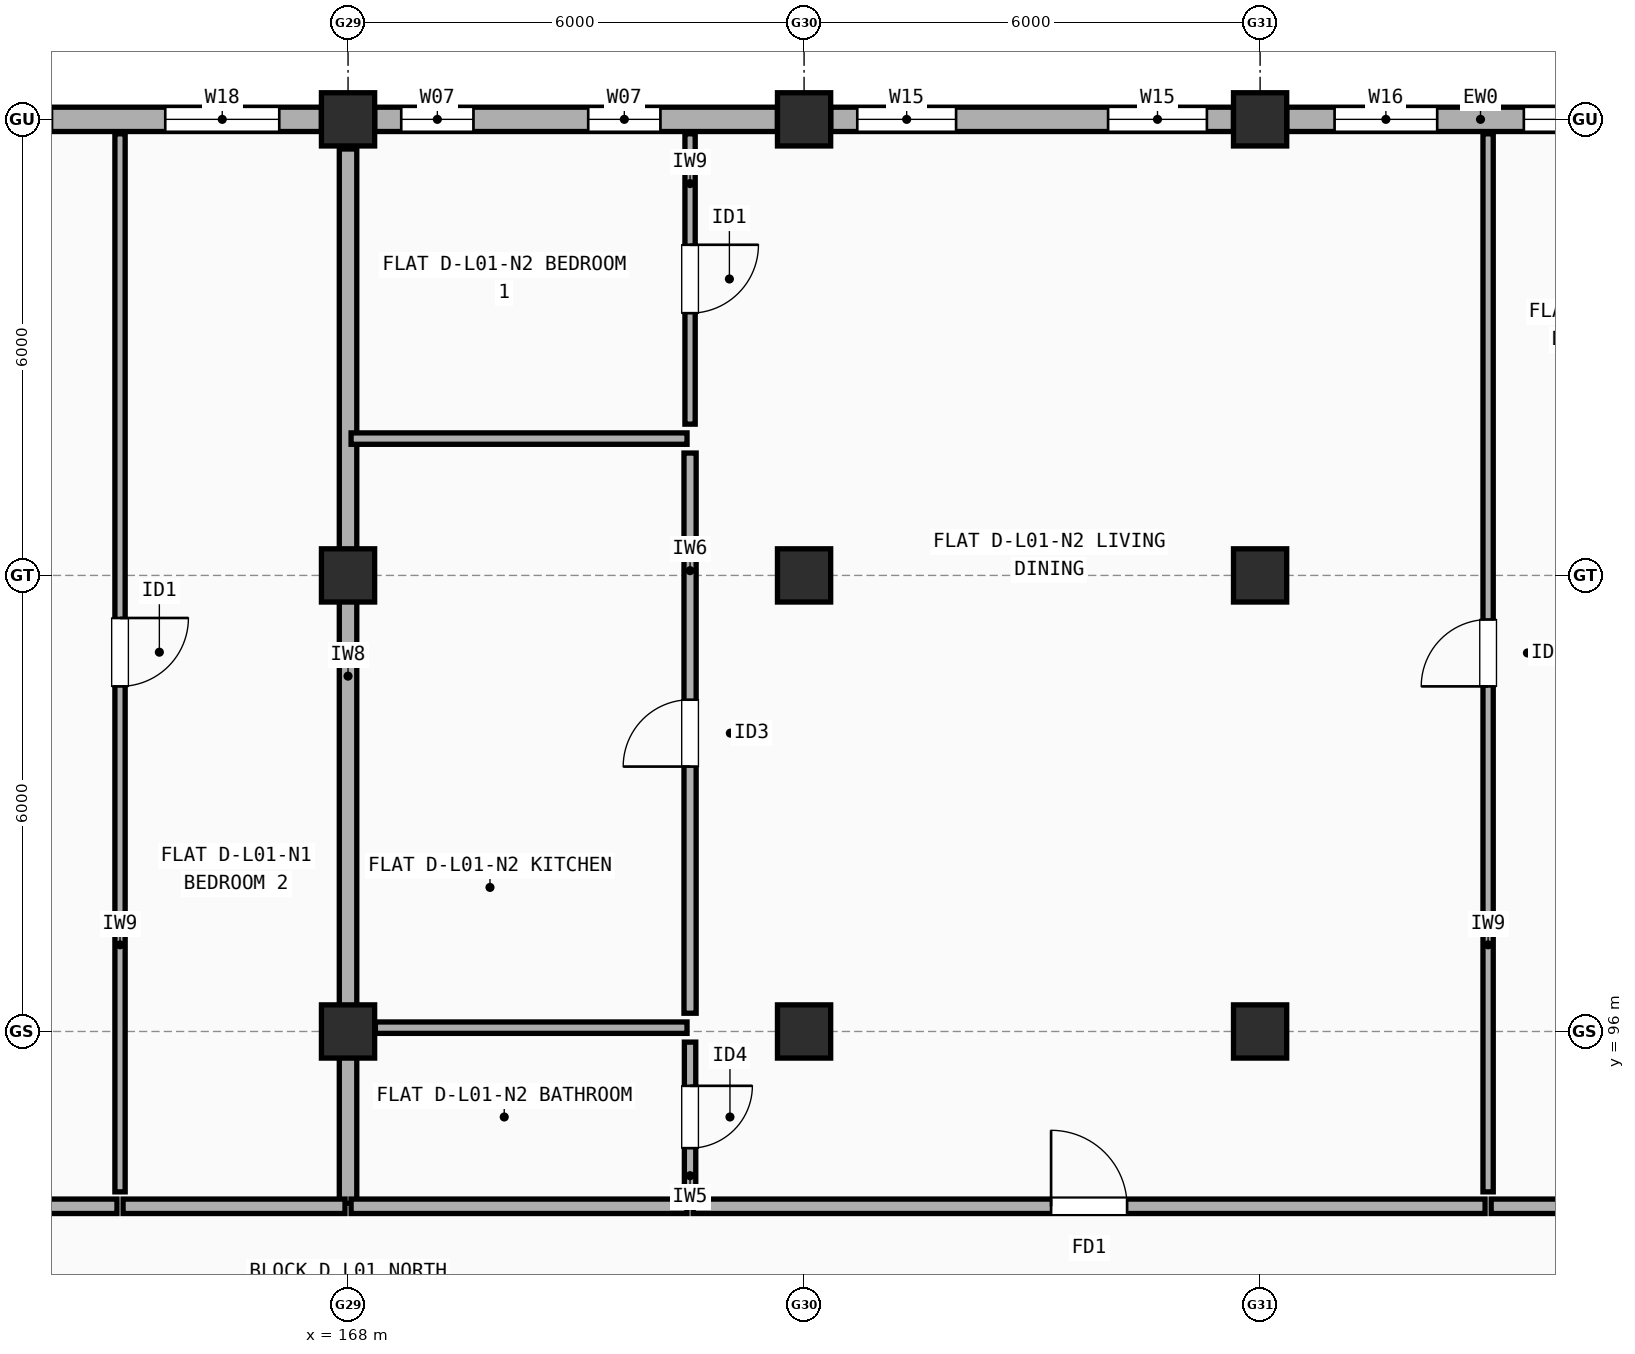
"""IFC4 building model, lengths in metres.
Left out: names, types, materials, properties, quantities, classifications, styles, units other than length and angle.
Written with IfcOpenShell. Run it as: python <this file> out.ifc"""

import sys

from ifc_helpers import new_model, si_unit, direction, frame, frame_2d, origin, origin_2d, place, context, subcontext, project, spatial, rectangle, extrude, element, fill, save


model = new_model("IFC4")
c1 = context("Model", 3, precision=1e-05, world=origin(), true_north=direction((0.0, 1.0)))
c2 = subcontext(c1, "Body", "Model", "MODEL_VIEW")
j1 = project(units=[si_unit("LENGTHUNIT", "METRE"), si_unit("PLANEANGLEUNIT", "RADIAN")], contexts=[c1])
p1 = place(None, origin())
s1 = spatial("IfcSite", under=j1, at=p1, CompositionType="ELEMENT")
p2 = place(p1, origin())
s2 = spatial("IfcBuilding", under=s1, at=p2, CompositionType="ELEMENT")
p3 = place(p2, frame((0.0, 0.0, 4.5)))
s3 = spatial("IfcBuildingStorey", under=s2, at=p3, CompositionType="ELEMENT", Elevation=4.5)
for number, where, z_axis, x_axis in (
    (1, (168.0, 96.0, 0.0), (0.0, 0.0, 1.0), (1.0, 0.0, 0.0)),
    (2, (168.0, 102.0, 0.0), (0.0, 0.0, 1.0), (1.0, 0.0, 0.0)),
    (3, (168.0, 108.0, 0.0), (0.0, 0.0, 1.0), (1.0, 0.0, 0.0)),
    (4, (174.0, 96.0, 0.0), (0.0, 0.0, 1.0), (1.0, 0.0, 0.0)),
    (5, (174.0, 102.0, 0.0), (0.0, 0.0, 1.0), (1.0, 0.0, 0.0)),
    (6, (174.0, 108.0, 0.0), (0.0, 0.0, 1.0), (1.0, 0.0, 0.0)),
    (7, (180.0, 96.0, 0.0), (0.0, 0.0, 1.0), (1.0, 0.0, 0.0)),
    (8, (180.0, 102.0, 0.0), (0.0, 0.0, 1.0), (1.0, 0.0, 0.0)),
    (9, (180.0, 108.0, 0.0), (0.0, 0.0, 1.0), (1.0, 0.0, 0.0)),
):
    element("IfcColumn", number, at=place(p3, frame(where, z_axis=z_axis, x_axis=x_axis)), inside=s3, PredefinedType="COLUMN", context=c2, shape_type="SweptSolid", body=[
        extrude(rectangle(XDim=0.7, YDim=0.7, at=origin_2d()), origin(), (0.0, 0.0, 1.0), 2.945),
    ])
p4 = place(p3, frame((185.7, 108.0, 0.0), z_axis=(0.0, 0.0, 1.0), x_axis=(-1.0, 0.0, 0.0)))
e10 = element("IfcWall", 10, at=p4, inside=s3, PredefinedType="STANDARD", context=c2, shape_type="SweptSolid", body=[
    extrude(rectangle(XDim=5.35, YDim=0.32, at=frame_2d((2.675, 0.0))), origin(), (0.0, 0.0, 1.0), 2.608),
])
p5 = place(p4, frame((0.43, 0.0, 0.9)))
e11 = element("IfcOpeningElement", 11, at=p5, cuts=e10, PredefinedType="OPENING", context=c2, shape_type="SweptSolid", body=[
    extrude(rectangle(XDim=1.8, YDim=1.45, at=frame_2d((0.9, 0.725))), frame((0.0, 0.17, 0.0), z_axis=(0.0, -1.0, 0.0), x_axis=(1.0, 0.0, 0.0)), (0.0, 0.0, 1.0), 0.34),
])
p6 = place(p4, frame((3.37, 0.0, 0.9)))
e12 = element("IfcOpeningElement", 12, at=p6, cuts=e10, PredefinedType="OPENING", context=c2, shape_type="SweptSolid", body=[
    extrude(rectangle(XDim=1.35, YDim=1.5, at=frame_2d((0.675, 0.75))), frame((0.0, 0.17, 0.0), z_axis=(0.0, -1.0, 0.0), x_axis=(1.0, 0.0, 0.0)), (0.0, 0.0, 1.0), 0.34),
])
p7 = place(p3, frame((179.65, 108.0, 0.0), z_axis=(0.0, 0.0, 1.0), x_axis=(-1.0, 0.0, 0.0)))
e13 = element("IfcWall", 13, at=p7, inside=s3, PredefinedType="STANDARD", context=c2, shape_type="SweptSolid", body=[
    extrude(rectangle(XDim=5.3, YDim=0.32, at=frame_2d((2.65, 0.0))), origin(), (0.0, 0.0, 1.0), 2.638),
])
p8 = place(p7, frame((0.35, 0.0, 0.9)))
e14 = element("IfcOpeningElement", 14, at=p8, cuts=e13, PredefinedType="OPENING", context=c2, shape_type="SweptSolid", body=[
    extrude(rectangle(XDim=1.3, YDim=1.45, at=frame_2d((0.65, 0.725))), frame((0.0, 0.17, 0.0), z_axis=(0.0, -1.0, 0.0), x_axis=(1.0, 0.0, 0.0)), (0.0, 0.0, 1.0), 0.34),
])
p9 = place(p7, frame((3.65, 0.0, 0.9)))
e15 = element("IfcOpeningElement", 15, at=p9, cuts=e13, PredefinedType="OPENING", context=c2, shape_type="SweptSolid", body=[
    extrude(rectangle(XDim=1.3, YDim=1.45, at=frame_2d((0.65, 0.725))), frame((0.0, 0.17, 0.0), z_axis=(0.0, -1.0, 0.0), x_axis=(1.0, 0.0, 0.0)), (0.0, 0.0, 1.0), 0.34),
])
p10 = place(p3, frame((173.65, 108.0, 0.0), z_axis=(0.0, 0.0, 1.0), x_axis=(-1.0, 0.0, 0.0)))
e16 = element("IfcWall", 16, at=p10, inside=s3, PredefinedType="STANDARD", context=c2, shape_type="SweptSolid", body=[
    extrude(rectangle(XDim=5.3, YDim=0.32, at=frame_2d((2.65, 0.0))), origin(), (0.0, 0.0, 1.0), 2.458),
])
p11 = place(p10, frame((1.54, 0.0, 0.9)))
e17 = element("IfcOpeningElement", 17, at=p11, cuts=e16, PredefinedType="OPENING", context=c2, shape_type="SweptSolid", body=[
    extrude(rectangle(XDim=0.95, YDim=1.35, at=frame_2d((0.475, 0.675))), frame((0.0, 0.17, 0.0), z_axis=(0.0, -1.0, 0.0), x_axis=(1.0, 0.0, 0.0)), (0.0, 0.0, 1.0), 0.34),
])
p12 = place(p10, frame((4.0, 0.0, 0.9)))
e18 = element("IfcOpeningElement", 18, at=p12, cuts=e16, PredefinedType="OPENING", context=c2, shape_type="SweptSolid", body=[
    extrude(rectangle(XDim=0.95, YDim=1.35, at=frame_2d((0.475, 0.675))), frame((0.0, 0.17, 0.0), z_axis=(0.0, -1.0, 0.0), x_axis=(1.0, 0.0, 0.0)), (0.0, 0.0, 1.0), 0.34),
])
p13 = place(p3, frame((167.65, 108.0, 0.0), z_axis=(0.0, 0.0, 1.0), x_axis=(-1.0, 0.0, 0.0)))
e19 = element("IfcWall", 19, at=p13, inside=s3, PredefinedType="STANDARD", context=c2, shape_type="SweptSolid", body=[
    extrude(rectangle(XDim=5.3, YDim=0.32, at=frame_2d((2.65, 0.0))), origin(), (0.0, 0.0, 1.0), 2.508),
])
p14 = place(p13, frame((0.555, 0.0, 0.9)))
e20 = element("IfcOpeningElement", 20, at=p14, cuts=e19, PredefinedType="OPENING", context=c2, shape_type="SweptSolid", body=[
    extrude(rectangle(XDim=1.5, YDim=1.4, at=frame_2d((0.75, 0.7))), frame((0.0, 0.17, 0.0), z_axis=(0.0, -1.0, 0.0), x_axis=(1.0, 0.0, 0.0)), (0.0, 0.0, 1.0), 0.34),
])
p15 = place(p13, frame((3.545, 0.0, 0.9)))
e21 = element("IfcOpeningElement", 21, at=p15, cuts=e19, PredefinedType="OPENING", context=c2, shape_type="SweptSolid", body=[
    extrude(rectangle(XDim=0.9, YDim=1.4, at=frame_2d((0.45, 0.7))), frame((0.0, 0.17, 0.0), z_axis=(0.0, -1.0, 0.0), x_axis=(1.0, 0.0, 0.0)), (0.0, 0.0, 1.0), 0.34),
])
p16 = place(p3, frame((168.0, 93.74, 0.0), z_axis=(0.0, 0.0, 1.0), x_axis=(0.0, 1.0, 0.0)))
e22 = element("IfcWall", 22, at=p16, inside=s3, PredefinedType="SOLIDWALL", context=c2, shape_type="SweptSolid", body=[
    extrude(rectangle(XDim=13.87, YDim=0.23, at=frame_2d((6.935, 0.0))), origin(), (0.0, 0.0, 1.0), 2.945),
])
p17 = place(p3, frame((154.54, 93.7, 0.0), z_axis=(0.0, 0.0, 1.0), x_axis=(1.0, 0.0, 0.0)))
e23 = element("IfcWall", 23, at=p17, inside=s3, PredefinedType="SOLIDWALL", context=c2, shape_type="SweptSolid", body=[
    extrude(rectangle(XDim=10.42, YDim=0.19, at=frame_2d((5.21, 0.0))), origin(), (0.0, 0.0, 1.0), 2.945),
])
p18 = place(p17, frame((4.72, 0.0, 0.0)))
e24 = element("IfcOpeningElement", 24, at=p18, cuts=e23, PredefinedType="OPENING", context=c2, shape_type="SweptSolid", body=[
    extrude(rectangle(XDim=0.98, YDim=2.15, at=frame_2d((0.49, 1.075))), frame((0.0, 0.105, 0.0), z_axis=(0.0, -1.0, 0.0), x_axis=(1.0, 0.0, 0.0)), (0.0, 0.0, 1.0), 0.21),
])
p19 = place(p3, frame((165.04, 93.7, 0.0), z_axis=(0.0, 0.0, 1.0), x_axis=(1.0, 0.0, 0.0)))
e25 = element("IfcWall", 25, at=p19, inside=s3, PredefinedType="SOLIDWALL", context=c2, shape_type="SweptSolid", body=[
    extrude(rectangle(XDim=2.92, YDim=0.19, at=frame_2d((1.46, 0.0))), origin(), (0.0, 0.0, 1.0), 2.945),
])
p20 = place(p3, frame((165.0, 93.89, 0.0), z_axis=(0.0, 0.0, 1.0), x_axis=(0.0, 1.0, 0.0)))
e26 = element("IfcWall", 26, at=p20, inside=s3, PredefinedType="PARTITIONING", context=c2, shape_type="SweptSolid", body=[
    extrude(rectangle(XDim=13.92, YDim=0.135, at=frame_2d((6.96, 0.0))), origin(), (0.0, 0.0, 1.0), 2.458),
])
p21 = place(p20, frame((6.65, 0.0, 0.0)))
e27 = element("IfcOpeningElement", 27, at=p21, cuts=e26, PredefinedType="OPENING", context=c2, shape_type="SweptSolid", body=[
    extrude(rectangle(XDim=0.9, YDim=2.1, at=frame_2d((0.45, 1.05))), frame((0.0, 0.077, 0.0), z_axis=(0.0, -1.0, 0.0), x_axis=(1.0, 0.0, 0.0)), (0.0, 0.0, 1.0), 0.155),
])
p22 = place(p3, frame((168.04, 93.7, 0.0), z_axis=(0.0, 0.0, 1.0), x_axis=(1.0, 0.0, 0.0)))
e28 = element("IfcWall", 28, at=p22, inside=s3, PredefinedType="SOLIDWALL", context=c2, shape_type="SweptSolid", body=[
    extrude(rectangle(XDim=4.42, YDim=0.19, at=frame_2d((2.21, 0.0))), origin(), (0.0, 0.0, 1.0), 2.945),
])
p23 = place(p3, frame((172.54, 93.7, 0.0), z_axis=(0.0, 0.0, 1.0), x_axis=(1.0, 0.0, 0.0)))
e29 = element("IfcWall", 29, at=p23, inside=s3, PredefinedType="SOLIDWALL", context=c2, shape_type="SweptSolid", body=[
    extrude(rectangle(XDim=10.42, YDim=0.19, at=frame_2d((5.21, 0.0))), origin(), (0.0, 0.0, 1.0), 2.945),
])
p24 = place(p23, frame((4.71, 0.0, 0.0)))
e30 = element("IfcOpeningElement", 30, at=p24, cuts=e29, PredefinedType="OPENING", context=c2, shape_type="SweptSolid", body=[
    extrude(rectangle(XDim=1.0, YDim=2.15, at=frame_2d((0.5, 1.075))), frame((0.0, 0.105, 0.0), z_axis=(0.0, -1.0, 0.0), x_axis=(1.0, 0.0, 0.0)), (0.0, 0.0, 1.0), 0.21),
])
p25 = place(p3, frame((172.5, 103.99, 0.0), z_axis=(0.0, 0.0, 1.0), x_axis=(0.0, 1.0, 0.0)))
e31 = element("IfcWall", 31, at=p25, inside=s3, PredefinedType="PARTITIONING", context=c2, shape_type="SweptSolid", body=[
    extrude(rectangle(XDim=3.82, YDim=0.135, at=frame_2d((1.91, 0.0))), origin(), (0.0, 0.0, 1.0), 2.945),
])
p26 = place(p25, frame((1.46, 0.0, 0.0)))
e32 = element("IfcOpeningElement", 32, at=p26, cuts=e31, PredefinedType="OPENING", context=c2, shape_type="SweptSolid", body=[
    extrude(rectangle(XDim=0.9, YDim=2.1, at=frame_2d((0.45, 1.05))), frame((0.0, 0.077, 0.0), z_axis=(0.0, -1.0, 0.0), x_axis=(1.0, 0.0, 0.0)), (0.0, 0.0, 1.0), 0.155),
])
p27 = place(p3, frame((172.5, 96.24, 0.0), z_axis=(0.0, 0.0, 1.0), x_axis=(0.0, 1.0, 0.0)))
e33 = element("IfcWall", 33, at=p27, inside=s3, PredefinedType="PLUMBINGWALL", context=c2, shape_type="SweptSolid", body=[
    extrude(rectangle(XDim=7.37, YDim=0.16, at=frame_2d((3.685, 0.0))), origin(), (0.0, 0.0, 1.0), 2.638),
])
p28 = place(p27, frame((3.245, 0.0, 0.0)))
e34 = element("IfcOpeningElement", 34, at=p28, cuts=e33, PredefinedType="OPENING", context=c2, shape_type="SweptSolid", body=[
    extrude(rectangle(XDim=0.88, YDim=2.1, at=frame_2d((0.44, 1.05))), frame((0.0, 0.09, 0.0), z_axis=(0.0, -1.0, 0.0), x_axis=(1.0, 0.0, 0.0)), (0.0, 0.0, 1.0), 0.18),
])
p29 = place(p3, frame((172.5, 93.89, 0.0), z_axis=(0.0, 0.0, 1.0), x_axis=(0.0, 1.0, 0.0)))
e35 = element("IfcWall", 35, at=p29, inside=s3, PredefinedType="PARTITIONING", context=c2, shape_type="SweptSolid", body=[
    extrude(rectangle(XDim=1.97, YDim=0.15, at=frame_2d((0.985, 0.0))), origin(), (0.0, 0.0, 1.0), 2.945),
])
p30 = place(p29, frame((0.575, 0.0, 0.0)))
e36 = element("IfcOpeningElement", 36, at=p30, cuts=e35, PredefinedType="OPENING", context=c2, shape_type="SweptSolid", body=[
    extrude(rectangle(XDim=0.82, YDim=2.08, at=frame_2d((0.41, 1.04))), frame((0.0, 0.085, 0.0), z_axis=(0.0, -1.0, 0.0), x_axis=(1.0, 0.0, 0.0)), (0.0, 0.0, 1.0), 0.17),
])
p31 = place(p3, frame((168.04, 103.8, 0.0), z_axis=(0.0, 0.0, 1.0), x_axis=(1.0, 0.0, 0.0)))
e37 = element("IfcWall", 37, at=p31, inside=s3, PredefinedType="PARTITIONING", context=c2, shape_type="SweptSolid", body=[
    extrude(rectangle(XDim=4.42, YDim=0.15, at=frame_2d((2.21, 0.0))), origin(), (0.0, 0.0, 1.0), 2.945),
])
p32 = place(p3, frame((168.36, 96.05, 0.0), z_axis=(0.0, 0.0, 1.0), x_axis=(1.0, 0.0, 0.0)))
e38 = element("IfcWall", 38, at=p32, inside=s3, PredefinedType="PARTITIONING", context=c2, shape_type="SweptSolid", body=[
    extrude(rectangle(XDim=4.1, YDim=0.15, at=frame_2d((2.05, 0.0))), origin(), (0.0, 0.0, 1.0), 2.608),
])
p33 = place(p3, frame((183.04, 93.7, 0.0), z_axis=(0.0, 0.0, 1.0), x_axis=(1.0, 0.0, 0.0)))
e39 = element("IfcWall", 39, at=p33, inside=s3, PredefinedType="SOLIDWALL", context=c2, shape_type="SweptSolid", body=[
    extrude(rectangle(XDim=2.92, YDim=0.19, at=frame_2d((1.46, 0.0))), origin(), (0.0, 0.0, 1.0), 2.945),
])
p34 = place(p3, frame((183.0, 93.89, 0.0), z_axis=(0.0, 0.0, 1.0), x_axis=(0.0, 1.0, 0.0)))
e40 = element("IfcWall", 40, at=p34, inside=s3, PredefinedType="PARTITIONING", context=c2, shape_type="SweptSolid", body=[
    extrude(rectangle(XDim=13.92, YDim=0.135, at=frame_2d((6.96, 0.0))), origin(), (0.0, 0.0, 1.0), 2.548),
])
p35 = place(p34, frame((6.65, 0.0, 0.0)))
e41 = element("IfcOpeningElement", 41, at=p35, cuts=e40, PredefinedType="OPENING", context=c2, shape_type="SweptSolid", body=[
    extrude(rectangle(XDim=0.88, YDim=2.1, at=frame_2d((0.44, 1.05))), frame((0.0, 0.077, 0.0), z_axis=(0.0, -1.0, 0.0), x_axis=(1.0, 0.0, 0.0)), (0.0, 0.0, 1.0), 0.155),
])
p36 = place(p5, origin())
e42 = element("IfcWindow", 42, at=p36, inside=s3, PartitioningType="SINGLE_PANEL", PredefinedType="WINDOW", context=c2, shape_type="SweptSolid", body=[
    extrude(rectangle(XDim=1.8, YDim=1.45, at=frame_2d((0.9, 0.725))), frame((0.0, 0.03, 0.0), z_axis=(0.0, -1.0, 0.0), x_axis=(1.0, 0.0, 0.0)), (0.0, 0.0, 1.0), 0.06),
])
fill(e11, e42)
p37 = place(p6, origin())
e43 = element("IfcWindow", 43, at=p37, inside=s3, PartitioningType="SINGLE_PANEL", PredefinedType="WINDOW", context=c2, shape_type="SweptSolid", body=[
    extrude(rectangle(XDim=1.35, YDim=1.5, at=frame_2d((0.675, 0.75))), frame((0.0, 0.03, 0.0), z_axis=(0.0, -1.0, 0.0), x_axis=(1.0, 0.0, 0.0)), (0.0, 0.0, 1.0), 0.06),
])
fill(e12, e43)
p38 = place(p8, origin())
e44 = element("IfcWindow", 44, at=p38, inside=s3, PartitioningType="SINGLE_PANEL", PredefinedType="WINDOW", context=c2, shape_type="SweptSolid", body=[
    extrude(rectangle(XDim=1.3, YDim=1.45, at=frame_2d((0.65, 0.725))), frame((0.0, 0.03, 0.0), z_axis=(0.0, -1.0, 0.0), x_axis=(1.0, 0.0, 0.0)), (0.0, 0.0, 1.0), 0.06),
])
fill(e14, e44)
p39 = place(p9, origin())
e45 = element("IfcWindow", 45, at=p39, inside=s3, PartitioningType="SINGLE_PANEL", PredefinedType="WINDOW", context=c2, shape_type="SweptSolid", body=[
    extrude(rectangle(XDim=1.3, YDim=1.45, at=frame_2d((0.65, 0.725))), frame((0.0, 0.03, 0.0), z_axis=(0.0, -1.0, 0.0), x_axis=(1.0, 0.0, 0.0)), (0.0, 0.0, 1.0), 0.06),
])
fill(e15, e45)
p40 = place(p11, origin())
e46 = element("IfcWindow", 46, at=p40, inside=s3, PartitioningType="SINGLE_PANEL", PredefinedType="WINDOW", context=c2, shape_type="SweptSolid", body=[
    extrude(rectangle(XDim=0.95, YDim=1.35, at=frame_2d((0.475, 0.675))), frame((0.0, 0.03, 0.0), z_axis=(0.0, -1.0, 0.0), x_axis=(1.0, 0.0, 0.0)), (0.0, 0.0, 1.0), 0.06),
])
fill(e17, e46)
p41 = place(p12, origin())
e47 = element("IfcWindow", 47, at=p41, inside=s3, PartitioningType="SINGLE_PANEL", PredefinedType="WINDOW", context=c2, shape_type="SweptSolid", body=[
    extrude(rectangle(XDim=0.95, YDim=1.35, at=frame_2d((0.475, 0.675))), frame((0.0, 0.03, 0.0), z_axis=(0.0, -1.0, 0.0), x_axis=(1.0, 0.0, 0.0)), (0.0, 0.0, 1.0), 0.06),
])
fill(e18, e47)
p42 = place(p14, origin())
e48 = element("IfcWindow", 48, at=p42, inside=s3, PartitioningType="SINGLE_PANEL", PredefinedType="WINDOW", context=c2, shape_type="SweptSolid", body=[
    extrude(rectangle(XDim=1.5, YDim=1.4, at=frame_2d((0.75, 0.7))), frame((0.0, 0.03, 0.0), z_axis=(0.0, -1.0, 0.0), x_axis=(1.0, 0.0, 0.0)), (0.0, 0.0, 1.0), 0.06),
])
fill(e20, e48)
p43 = place(p21, origin())
e49 = element("IfcDoor", 49, at=p43, inside=s3, OperationType="SINGLE_SWING_RIGHT", PredefinedType="DOOR", context=c2, shape_type="SweptSolid", body=[
    extrude(rectangle(XDim=0.9, YDim=2.1, at=frame_2d((0.45, 1.05))), frame((0.0, 0.025, 0.0), z_axis=(0.0, -1.0, 0.0), x_axis=(1.0, 0.0, 0.0)), (0.0, 0.0, 1.0), 0.05),
])
fill(e27, e49)
p44 = place(p24, origin())
e50 = element("IfcDoor", 50, at=p44, inside=s3, OperationType="SINGLE_SWING_LEFT", PredefinedType="DOOR", context=c2, shape_type="SweptSolid", body=[
    extrude(rectangle(XDim=1.0, YDim=2.15, at=frame_2d((0.5, 1.075))), frame((0.0, 0.025, 0.0), z_axis=(0.0, -1.0, 0.0), x_axis=(1.0, 0.0, 0.0)), (0.0, 0.0, 1.0), 0.05),
])
fill(e30, e50)
p45 = place(p26, origin())
e51 = element("IfcDoor", 51, at=p45, inside=s3, OperationType="SINGLE_SWING_RIGHT", PredefinedType="DOOR", context=c2, shape_type="SweptSolid", body=[
    extrude(rectangle(XDim=0.9, YDim=2.1, at=frame_2d((0.45, 1.05))), frame((0.0, 0.025, 0.0), z_axis=(0.0, -1.0, 0.0), x_axis=(1.0, 0.0, 0.0)), (0.0, 0.0, 1.0), 0.05),
])
fill(e32, e51)
p46 = place(p28, origin())
e52 = element("IfcDoor", 52, at=p46, inside=s3, OperationType="SINGLE_SWING_LEFT", PredefinedType="DOOR", context=c2, shape_type="SweptSolid", body=[
    extrude(rectangle(XDim=0.88, YDim=2.1, at=frame_2d((0.44, 1.05))), frame((0.0, 0.025, 0.0), z_axis=(0.0, -1.0, 0.0), x_axis=(1.0, 0.0, 0.0)), (0.0, 0.0, 1.0), 0.05),
])
fill(e34, e52)
p47 = place(p30, origin())
e53 = element("IfcDoor", 53, at=p47, inside=s3, OperationType="SINGLE_SWING_RIGHT", PredefinedType="DOOR", context=c2, shape_type="SweptSolid", body=[
    extrude(rectangle(XDim=0.82, YDim=2.08, at=frame_2d((0.41, 1.04))), frame((0.0, 0.025, 0.0), z_axis=(0.0, -1.0, 0.0), x_axis=(1.0, 0.0, 0.0)), (0.0, 0.0, 1.0), 0.05),
])
fill(e36, e53)
p48 = place(p35, origin())
e54 = element("IfcDoor", 54, at=p48, inside=s3, OperationType="SINGLE_SWING_LEFT", PredefinedType="DOOR", context=c2, shape_type="SweptSolid", body=[
    extrude(rectangle(XDim=0.88, YDim=2.1, at=frame_2d((0.44, 1.05))), frame((0.0, 0.025, 0.0), z_axis=(0.0, -1.0, 0.0), x_axis=(1.0, 0.0, 0.0)), (0.0, 0.0, 1.0), 0.05),
])
fill(e41, e54)
save(model, sys.argv[1])
